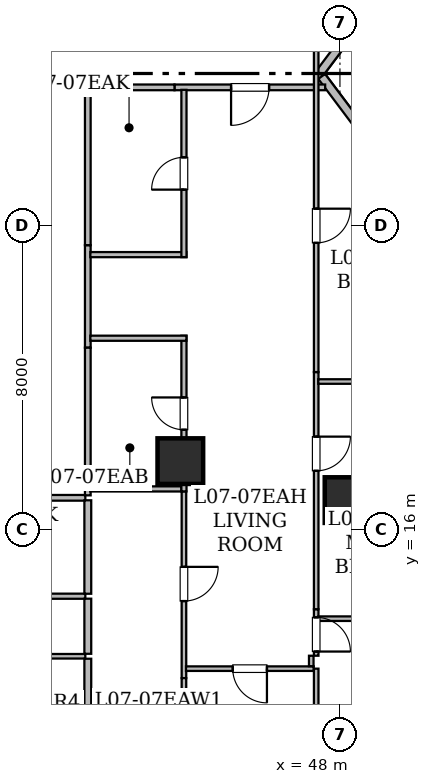
"""IFC4 building model, lengths in metres.
Left out: names, types, materials, properties, quantities, classifications, styles, units other than length and angle.
Written with IfcOpenShell. Run it as: python <this file> out.ifc"""

import sys

from ifc_helpers import new_model, si_unit, direction, frame, frame_2d, origin, origin_2d, place, context, subcontext, project, spatial, rectangle, hollow_rectangle, extrude, element, fill, save


model = new_model("IFC4")
c1 = context("Model", 3, precision=1e-05, world=origin(), true_north=direction((0.0, 1.0)))
c2 = subcontext(c1, "Body", "Model", "MODEL_VIEW")
j1 = project(units=[si_unit("LENGTHUNIT", "METRE"), si_unit("PLANEANGLEUNIT", "RADIAN")], contexts=[c1])
p1 = place(None, origin())
s1 = spatial("IfcSite", under=j1, at=p1, CompositionType="ELEMENT")
p2 = place(p1, origin())
s2 = spatial("IfcBuilding", under=s1, at=p2, CompositionType="ELEMENT")
p3 = place(p2, frame((0.0, 0.0, 33.3)))
s3 = spatial("IfcBuildingStorey", under=s2, at=p3, CompositionType="ELEMENT", Elevation=33.3)
for number, where, z_axis, x_axis in (
    (1, (48.2, 16.775, 0.025), (0.0, 0.0, 1.0), (1.0, 0.0, 0.0)),
    (2, (43.8, 17.8, 0.025), (0.0, 0.0, 1.0), (1.0, 0.0, 0.0)),
):
    element("IfcColumn", number, at=place(p3, frame(where, z_axis=z_axis, x_axis=x_axis)), inside=s3, PredefinedType="COLUMN", context=c2, shape_type="SweptSolid", body=[
        extrude(hollow_rectangle(XDim=1.2, YDim=1.2, WallThickness=0.06, at=origin_2d()), origin(), (0.0, 0.0, 1.0), 3.625),
    ])
p4 = place(p3, frame((49.856, 31.191, 0.0), z_axis=(0.0, 0.0, 1.0), x_axis=(-0.600137081448, -0.799897170561, 0.0)))
e3 = element("IfcWall", 3, at=p4, inside=s3, PredefinedType="STANDARD", context=c2, shape_type="SweptSolid", body=[
    extrude(rectangle(XDim=3.989, YDim=0.22, at=frame_2d((1.995, 0.0))), origin(), (0.0, 0.0, 1.0), 3.43),
])
p5 = place(p3, frame((47.519, 27.923, 0.0), z_axis=(0.0, 0.0, 1.0), x_axis=(0.600118645218, -0.799911002338, 0.0)))
e4 = element("IfcWall", 4, at=p5, inside=s3, PredefinedType="STANDARD", context=c2, shape_type="SweptSolid", body=[
    extrude(rectangle(XDim=3.951, YDim=0.22, at=frame_2d((1.975, 0.0))), origin(), (0.0, 0.0, 1.0), 3.43),
])
p6 = place(p3, frame((41.3, 16.835, 0.0), z_axis=(0.0, 0.0, 1.0), x_axis=(-1.0, 0.0, 0.0)))
e5 = element("IfcWall", 5, at=p6, inside=s3, PredefinedType="STANDARD", context=c2, shape_type="SweptSolid", body=[
    extrude(rectangle(XDim=7.001, YDim=0.15, at=frame_2d((3.5, 0.0))), origin(), (0.0, 0.0, 1.0), 3.43),
])
p7 = place(p3, frame((41.365, 17.318, 0.0), z_axis=(0.0, 0.0, 1.0), x_axis=(0.0, -1.0, 0.0)))
e6 = element("IfcWall", 6, at=p7, inside=s3, PredefinedType="STANDARD", context=c2, shape_type="SweptSolid", body=[
    extrude(rectangle(XDim=0.418, YDim=0.15, at=frame_2d((0.209, 0.0))), origin(), (0.0, 0.0, 1.0), 3.43),
])
p8 = place(p3, frame((47.611, 27.635, 0.0), z_axis=(0.0, 0.0, 1.0), x_axis=(-1.0, 0.0, 0.0)))
e7 = element("IfcWall", 7, at=p8, inside=s3, PredefinedType="STANDARD", context=c2, shape_type="SweptSolid", body=[
    extrude(rectangle(XDim=3.965, YDim=0.15, at=frame_2d((1.982, 0.0))), origin(), (0.0, 0.0, 1.0), 2.647),
])
p9 = place(p8, frame((1.476, 0.0, 0.0)))
e8 = element("IfcOpeningElement", 8, at=p9, cuts=e7, PredefinedType="OPENING", context=c2, shape_type="SweptSolid", body=[
    extrude(rectangle(XDim=1.0, YDim=2.15, at=frame_2d((0.5, 1.075))), frame((0.0, 0.085, 0.0), z_axis=(0.0, -1.0, 0.0), x_axis=(1.0, 0.0, 0.0)), (0.0, 0.0, 1.0), 0.17),
])
p10 = place(p3, frame((41.365, 23.483, 0.0), z_axis=(0.0, 0.0, 1.0), x_axis=(0.0, -1.0, 0.0)))
e9 = element("IfcWall", 9, at=p10, inside=s3, PredefinedType="STANDARD", context=c2, shape_type="SweptSolid", body=[
    extrude(rectangle(XDim=2.698, YDim=0.15, at=frame_2d((1.349, 0.0))), origin(), (0.0, 0.0, 1.0), 3.43),
])
p11 = place(p3, frame((41.365, 20.785, 0.0), z_axis=(0.0, 0.0, 1.0), x_axis=(0.0, -1.0, 0.0)))
e10 = element("IfcWall", 10, at=p11, inside=s3, PredefinedType="STANDARD", context=c2, shape_type="SweptSolid", body=[
    extrude(rectangle(XDim=3.467, YDim=0.15, at=frame_2d((1.733, 0.0))), origin(), (0.0, 0.0, 1.0), 2.647),
])
p12 = place(p3, frame((43.646, 27.635, 0.0), z_axis=(0.0, 0.0, 1.0), x_axis=(-1.0, 0.0, 0.0)))
e11 = element("IfcWall", 11, at=p12, inside=s3, PredefinedType="STANDARD", context=c2, shape_type="SweptSolid", body=[
    extrude(rectangle(XDim=2.346, YDim=0.15, at=frame_2d((1.173, 0.0))), origin(), (0.0, 0.0, 1.0), 2.647),
])
p13 = place(p3, frame((41.365, 27.698, 0.0), z_axis=(0.0, 0.0, 1.0), x_axis=(0.0, -1.0, 0.0)))
e12 = element("IfcWall", 12, at=p13, inside=s3, PredefinedType="STANDARD", context=c2, shape_type="SweptSolid", body=[
    extrude(rectangle(XDim=4.215, YDim=0.15, at=frame_2d((2.107, 0.0))), origin(), (0.0, 0.0, 1.0), 2.957),
])
p14 = place(p3, frame((33.985, 14.246, 0.0), z_axis=(0.0, 0.0, 1.0), x_axis=(1.0, 0.0, 0.0)))
e13 = element("IfcWall", 13, at=p14, inside=s3, PredefinedType="PARTITIONING", context=c2, shape_type="SweptSolid", body=[
    extrude(rectangle(XDim=7.315, YDim=0.135, at=frame_2d((3.657, 0.0))), origin(), (0.0, 0.0, 1.0), 3.43),
])
p15 = place(p14, frame((3.233, 0.0, 0.0)))
e14 = element("IfcOpeningElement", 14, at=p15, cuts=e13, PredefinedType="OPENING", context=c2, shape_type="SweptSolid", body=[
    extrude(rectangle(XDim=0.85, YDim=2.1, at=frame_2d((0.425, 1.05))), frame((0.0, 0.077, 0.0), z_axis=(0.0, -1.0, 0.0), x_axis=(1.0, 0.0, 0.0)), (0.0, 0.0, 1.0), 0.155),
])
p16 = place(p3, frame((41.3, 12.666, 0.0), z_axis=(0.0, 0.0, 1.0), x_axis=(-1.0, 0.0, 0.0)))
e15 = element("IfcWall", 15, at=p16, inside=s3, PredefinedType="PARTITIONING", context=c2, shape_type="SweptSolid", body=[
    extrude(rectangle(XDim=6.48, YDim=0.12, at=frame_2d((3.24, 0.0))), origin(), (0.0, 0.0, 1.0), 3.43),
])
p17 = place(p16, frame((2.79, 0.0, 0.0)))
e16 = element("IfcOpeningElement", 16, at=p17, cuts=e15, PredefinedType="OPENING", context=c2, shape_type="SweptSolid", body=[
    extrude(rectangle(XDim=0.9, YDim=2.1, at=frame_2d((0.45, 1.05))), frame((0.0, 0.07, 0.0), z_axis=(0.0, -1.0, 0.0), x_axis=(1.0, 0.0, 0.0)), (0.0, 0.0, 1.0), 0.14),
])
p18 = place(p3, frame((41.365, 14.181, 0.0), z_axis=(0.0, 0.0, 1.0), x_axis=(0.0, -1.0, 0.0)))
e17 = element("IfcWall", 17, at=p18, inside=s3, PredefinedType="STANDARD", context=c2, shape_type="SweptSolid", body=[
    extrude(rectangle(XDim=1.45, YDim=0.18, at=frame_2d((0.725, 0.0))), origin(), (0.0, 0.0, 1.0), 3.43),
])
p19 = place(p3, frame((41.365, 16.77, 0.0), z_axis=(0.0, 0.0, 1.0), x_axis=(0.0, -1.0, 0.0)))
e18 = element("IfcWall", 18, at=p19, inside=s3, PredefinedType="STANDARD", context=c2, shape_type="SweptSolid", body=[
    extrude(rectangle(XDim=2.459, YDim=0.18, at=frame_2d((1.229, 0.0))), origin(), (0.0, 0.0, 1.0), 3.43),
])
p20 = place(p3, frame((41.365, 12.601, 0.0), z_axis=(0.0, 0.0, 1.0), x_axis=(0.0, -1.0, 0.0)))
e19 = element("IfcWall", 19, at=p20, inside=s3, PredefinedType="STANDARD", context=c2, shape_type="SweptSolid", body=[
    extrude(rectangle(XDim=3.503, YDim=0.18, at=frame_2d((1.751, 0.0))), origin(), (0.0, 0.0, 1.0), 3.43),
])
p21 = place(p3, frame((43.895, 17.004, 0.0), z_axis=(0.0, 0.0, 1.0), x_axis=(0.0, -1.0, 0.0)))
e20 = element("IfcWall", 20, at=p21, inside=s3, PredefinedType="PARTITIONING", context=c2, shape_type="SweptSolid", body=[
    extrude(rectangle(XDim=4.913, YDim=0.12, at=frame_2d((2.457, 0.0))), origin(), (0.0, 0.0, 1.0), 2.647),
])
p22 = place(p21, frame((1.986, 0.0, 0.0)))
e21 = element("IfcOpeningElement", 21, at=p22, cuts=e20, PredefinedType="OPENING", context=c2, shape_type="SweptSolid", body=[
    extrude(rectangle(XDim=0.9, YDim=2.1, at=frame_2d((0.45, 1.05))), frame((0.0, 0.07, 0.0), z_axis=(0.0, -1.0, 0.0), x_axis=(1.0, 0.0, 0.0)), (0.0, 0.0, 1.0), 0.14),
])
p23 = place(p3, frame((43.895, 12.091, 0.0), z_axis=(0.0, 0.0, 1.0), x_axis=(0.0, -1.0, 0.0)))
e22 = element("IfcWall", 22, at=p23, inside=s3, PredefinedType="PARTITIONING", context=c2, shape_type="SweptSolid", body=[
    extrude(rectangle(XDim=8.879, YDim=0.12, at=frame_2d((4.439, 0.0))), origin(), (0.0, 0.0, 1.0), 2.647),
])
p24 = place(p23, frame((3.989, 0.0, 0.0)))
e23 = element("IfcOpeningElement", 23, at=p24, cuts=e22, PredefinedType="OPENING", context=c2, shape_type="SweptSolid", body=[
    extrude(rectangle(XDim=0.9, YDim=2.1, at=frame_2d((0.45, 1.05))), frame((0.0, 0.07, 0.0), z_axis=(0.0, -1.0, 0.0), x_axis=(1.0, 0.0, 0.0)), (0.0, 0.0, 1.0), 0.14),
])
p25 = place(p3, frame((41.432, 17.069, 0.0), z_axis=(0.0, 0.0, 1.0), x_axis=(1.0, 0.0, 0.0)))
e24 = element("IfcWall", 24, at=p25, inside=s3, PredefinedType="PARTITIONING", context=c2, shape_type="SweptSolid", body=[
    extrude(rectangle(XDim=2.398, YDim=0.135, at=frame_2d((1.199, 0.0))), origin(), (0.0, 0.0, 1.0), 2.647),
])
p26 = place(p3, frame((47.31, 12.34, 0.0), z_axis=(0.0, 0.0, 1.0), x_axis=(-1.0, 0.0, 0.0)))
e25 = element("IfcWall", 25, at=p26, inside=s3, PredefinedType="PARTITIONING", context=c2, shape_type="SweptSolid", body=[
    extrude(rectangle(XDim=3.361, YDim=0.12, at=frame_2d((1.681, 0.0))), origin(), (0.0, 0.0, 1.0), 2.647),
])
p27 = place(p26, frame((1.231, 0.0, 0.0)))
e26 = element("IfcOpeningElement", 26, at=p27, cuts=e25, PredefinedType="OPENING", context=c2, shape_type="SweptSolid", body=[
    extrude(rectangle(XDim=0.9, YDim=2.1, at=frame_2d((0.45, 1.05))), frame((0.0, 0.07, 0.0), z_axis=(0.0, -1.0, 0.0), x_axis=(1.0, 0.0, 0.0)), (0.0, 0.0, 1.0), 0.14),
])
p28 = place(p3, frame((47.245, 12.68, 0.0), z_axis=(0.0, 0.0, 1.0), x_axis=(0.0, -1.0, 0.0)))
e27 = element("IfcWall", 27, at=p28, inside=s3, PredefinedType="PARTITIONING", context=c2, shape_type="SweptSolid", body=[
    extrude(rectangle(XDim=0.275, YDim=0.12, at=frame_2d((0.137, 0.0))), origin(), (0.0, 0.0, 1.0), 3.43),
])
p29 = place(p3, frame((43.895, 17.004, 0.0), z_axis=(0.0, 0.0, 1.0), x_axis=(0.0, 1.0, 0.0)))
e28 = element("IfcWall", 28, at=p29, inside=s3, PredefinedType="PARTITIONING", context=c2, shape_type="SweptSolid", body=[
    extrude(rectangle(XDim=4.095, YDim=0.135, at=frame_2d((2.048, 0.0))), origin(), (0.0, 0.0, 1.0), 2.647),
])
p30 = place(p29, frame((1.622, 0.0, 0.0)))
e29 = element("IfcOpeningElement", 29, at=p30, cuts=e28, PredefinedType="OPENING", context=c2, shape_type="SweptSolid", body=[
    extrude(rectangle(XDim=0.85, YDim=2.1, at=frame_2d((0.425, 1.05))), frame((0.0, 0.077, 0.0), z_axis=(0.0, -1.0, 0.0), x_axis=(1.0, 0.0, 0.0)), (0.0, 0.0, 1.0), 0.155),
])
for number, where, z_axis, x_axis in (
    (30, (43.96, 21.034, 0.0), (0.0, 0.0, 1.0), (-1.0, 0.0, 0.0)),
    (31, (41.432, 23.234, 0.0), (0.0, 0.0, 1.0), (1.0, 0.0, 0.0)),
):
    element("IfcWall", number, at=place(p3, frame(where, z_axis=z_axis, x_axis=x_axis)), inside=s3, PredefinedType="PARTITIONING", context=c2, shape_type="SweptSolid", body=[
        extrude(rectangle(XDim=2.528, YDim=0.135, at=frame_2d((1.264, 0.0))), origin(), (0.0, 0.0, 1.0), 2.647),
    ])
p31 = place(p3, frame((43.895, 23.169, 0.0), z_axis=(0.0, 0.0, 1.0), x_axis=(0.0, 1.0, 0.0)))
e32 = element("IfcWall", 32, at=p31, inside=s3, PredefinedType="PARTITIONING", context=c2, shape_type="SweptSolid", body=[
    extrude(rectangle(XDim=4.401, YDim=0.135, at=frame_2d((2.201, 0.0))), origin(), (0.0, 0.0, 1.0), 2.647),
])
p32 = place(p31, frame((1.775, 0.0, 0.0)))
e33 = element("IfcOpeningElement", 33, at=p32, cuts=e32, PredefinedType="OPENING", context=c2, shape_type="SweptSolid", body=[
    extrude(rectangle(XDim=0.85, YDim=2.1, at=frame_2d((0.425, 1.05))), frame((0.0, 0.077, 0.0), z_axis=(0.0, -1.0, 0.0), x_axis=(1.0, 0.0, 0.0)), (0.0, 0.0, 1.0), 0.155),
])
p33 = place(p3, frame((47.375, 13.904, 0.0), z_axis=(0.0, 0.0, 1.0), x_axis=(0.0, -1.0, 0.0)))
e34 = element("IfcWall", 34, at=p33, inside=s3, PredefinedType="PARTITIONING", context=c2, shape_type="SweptSolid", body=[
    extrude(rectangle(XDim=1.224, YDim=0.12, at=frame_2d((0.612, 0.0))), origin(), (0.0, 0.0, 1.0), 2.803),
])
p34 = place(p33, frame((0.214, 0.0, 0.0)))
e35 = element("IfcOpeningElement", 35, at=p34, cuts=e34, PredefinedType="OPENING", context=c2, shape_type="SweptSolid", body=[
    extrude(rectangle(XDim=0.9, YDim=2.1, at=frame_2d((0.45, 1.05))), frame((0.0, 0.07, 0.0), z_axis=(0.0, -1.0, 0.0), x_axis=(1.0, 0.0, 0.0)), (0.0, 0.0, 1.0), 0.14),
])
p35 = place(p3, frame((47.375, 20.144, 0.0), z_axis=(0.0, 0.0, 1.0), x_axis=(0.0, -1.0, 0.0)))
e36 = element("IfcWall", 36, at=p35, inside=s3, PredefinedType="PARTITIONING", context=c2, shape_type="SweptSolid", body=[
    extrude(rectangle(XDim=6.24, YDim=0.12, at=frame_2d((3.12, 0.0))), origin(), (0.0, 0.0, 1.0), 2.647),
])
p36 = place(p35, frame((1.699, 0.0, 0.0)))
e37 = element("IfcOpeningElement", 37, at=p36, cuts=e36, PredefinedType="OPENING", context=c2, shape_type="SweptSolid", body=[
    extrude(rectangle(XDim=0.9, YDim=2.1, at=frame_2d((0.45, 1.05))), frame((0.0, 0.07, 0.0), z_axis=(0.0, -1.0, 0.0), x_axis=(1.0, 0.0, 0.0)), (0.0, 0.0, 1.0), 0.14),
])
p37 = place(p3, frame((47.375, 30.17, 0.0), z_axis=(0.0, 0.0, 1.0), x_axis=(0.0, -1.0, 0.0)))
e38 = element("IfcWall", 38, at=p37, inside=s3, PredefinedType="PARTITIONING", context=c2, shape_type="SweptSolid", body=[
    extrude(rectangle(XDim=10.026, YDim=0.12, at=frame_2d((5.013, 0.0))), origin(), (0.0, 0.0, 1.0), 2.957),
])
p38 = place(p37, frame((5.727, 0.0, 0.0)))
e39 = element("IfcOpeningElement", 39, at=p38, cuts=e38, PredefinedType="OPENING", context=c2, shape_type="SweptSolid", body=[
    extrude(rectangle(XDim=0.9, YDim=2.1, at=frame_2d((0.45, 1.05))), frame((0.0, 0.07, 0.0), z_axis=(0.0, -1.0, 0.0), x_axis=(1.0, 0.0, 0.0)), (0.0, 0.0, 1.0), 0.14),
])
p39 = place(p3, frame((47.375, 12.34, 0.0), z_axis=(0.0, 0.0, 1.0), x_axis=(0.0, -1.0, 0.0)))
e40 = element("IfcWall", 40, at=p39, inside=s3, PredefinedType="PARTITIONING", context=c2, shape_type="SweptSolid", body=[
    extrude(rectangle(XDim=7.618, YDim=0.12, at=frame_2d((3.809, 0.0))), origin(), (0.0, 0.0, 1.0), 3.43),
])
p40 = place(p39, frame((3.359, 0.0, 0.0)))
e41 = element("IfcOpeningElement", 41, at=p40, cuts=e40, PredefinedType="OPENING", context=c2, shape_type="SweptSolid", body=[
    extrude(rectangle(XDim=0.9, YDim=2.1, at=frame_2d((0.45, 1.05))), frame((0.0, 0.07, 0.0), z_axis=(0.0, -1.0, 0.0), x_axis=(1.0, 0.0, 0.0)), (0.0, 0.0, 1.0), 0.14),
])
p41 = place(p3, frame((47.429, 13.655, 0.0), z_axis=(0.0, 0.0, 1.0), x_axis=(1.0, 0.0, 0.0)))
e42 = element("IfcWall", 42, at=p41, inside=s3, PredefinedType="PARTITIONING", context=c2, shape_type="SweptSolid", body=[
    extrude(rectangle(XDim=2.359, YDim=0.12, at=frame_2d((1.18, 0.0))), origin(), (0.0, 0.0, 1.0), 3.43),
])
p42 = place(p3, frame((47.429, 19.895, 0.0), z_axis=(0.0, 0.0, 1.0), x_axis=(1.0, 0.0, 0.0)))
e43 = element("IfcWall", 43, at=p42, inside=s3, PredefinedType="PARTITIONING", context=c2, shape_type="SweptSolid", body=[
    extrude(rectangle(XDim=2.359, YDim=0.12, at=frame_2d((1.18, 0.0))), origin(), (0.0, 0.0, 1.0), 2.803),
])
p43 = place(p9, origin())
e44 = element("IfcDoor", 44, at=p43, inside=s3, OperationType="SINGLE_SWING_RIGHT", PredefinedType="DOOR", context=c2, shape_type="SweptSolid", body=[
    extrude(rectangle(XDim=1.0, YDim=2.15, at=frame_2d((0.5, 1.075))), frame((0.0, 0.025, 0.0), z_axis=(0.0, -1.0, 0.0), x_axis=(1.0, 0.0, 0.0)), (0.0, 0.0, 1.0), 0.05),
])
fill(e8, e44)
p44 = place(p22, origin())
e45 = element("IfcDoor", 45, at=p44, inside=s3, OperationType="SINGLE_SWING_LEFT", PredefinedType="DOOR", context=c2, shape_type="SweptSolid", body=[
    extrude(rectangle(XDim=0.9, YDim=2.1, at=frame_2d((0.45, 1.05))), frame((0.0, 0.025, 0.0), z_axis=(0.0, -1.0, 0.0), x_axis=(1.0, 0.0, 0.0)), (0.0, 0.0, 1.0), 0.05),
])
fill(e21, e45)
p45 = place(p27, origin())
e46 = element("IfcDoor", 46, at=p45, inside=s3, OperationType="SINGLE_SWING_LEFT", PredefinedType="DOOR", context=c2, shape_type="SweptSolid", body=[
    extrude(rectangle(XDim=0.9, YDim=2.1, at=frame_2d((0.45, 1.05))), frame((0.0, 0.025, 0.0), z_axis=(0.0, -1.0, 0.0), x_axis=(1.0, 0.0, 0.0)), (0.0, 0.0, 1.0), 0.05),
])
fill(e26, e46)
p46 = place(p30, origin())
e47 = element("IfcDoor", 47, at=p46, inside=s3, OperationType="SINGLE_SWING_RIGHT", PredefinedType="DOOR", context=c2, shape_type="SweptSolid", body=[
    extrude(rectangle(XDim=0.85, YDim=2.1, at=frame_2d((0.425, 1.05))), frame((0.0, 0.025, 0.0), z_axis=(0.0, -1.0, 0.0), x_axis=(1.0, 0.0, 0.0)), (0.0, 0.0, 1.0), 0.05),
])
fill(e29, e47)
p47 = place(p32, origin())
e48 = element("IfcDoor", 48, at=p47, inside=s3, OperationType="SINGLE_SWING_LEFT", PredefinedType="DOOR", context=c2, shape_type="SweptSolid", body=[
    extrude(rectangle(XDim=0.85, YDim=2.1, at=frame_2d((0.425, 1.05))), frame((0.0, 0.025, 0.0), z_axis=(0.0, -1.0, 0.0), x_axis=(1.0, 0.0, 0.0)), (0.0, 0.0, 1.0), 0.05),
])
fill(e33, e48)
p48 = place(p34, origin())
e49 = element("IfcDoor", 49, at=p48, inside=s3, OperationType="SINGLE_SWING_RIGHT", PredefinedType="DOOR", context=c2, shape_type="SweptSolid", body=[
    extrude(rectangle(XDim=0.9, YDim=2.1, at=frame_2d((0.45, 1.05))), frame((0.0, 0.025, 0.0), z_axis=(0.0, -1.0, 0.0), x_axis=(1.0, 0.0, 0.0)), (0.0, 0.0, 1.0), 0.05),
])
fill(e35, e49)
p49 = place(p36, origin())
e50 = element("IfcDoor", 50, at=p49, inside=s3, OperationType="SINGLE_SWING_LEFT", PredefinedType="DOOR", context=c2, shape_type="SweptSolid", body=[
    extrude(rectangle(XDim=0.9, YDim=2.1, at=frame_2d((0.45, 1.05))), frame((0.0, 0.025, 0.0), z_axis=(0.0, -1.0, 0.0), x_axis=(1.0, 0.0, 0.0)), (0.0, 0.0, 1.0), 0.05),
])
fill(e37, e50)
p50 = place(p38, origin())
e51 = element("IfcDoor", 51, at=p50, inside=s3, OperationType="SINGLE_SWING_LEFT", PredefinedType="DOOR", context=c2, shape_type="SweptSolid", body=[
    extrude(rectangle(XDim=0.9, YDim=2.1, at=frame_2d((0.45, 1.05))), frame((0.0, 0.025, 0.0), z_axis=(0.0, -1.0, 0.0), x_axis=(1.0, 0.0, 0.0)), (0.0, 0.0, 1.0), 0.05),
])
fill(e39, e51)
save(model, sys.argv[1])
